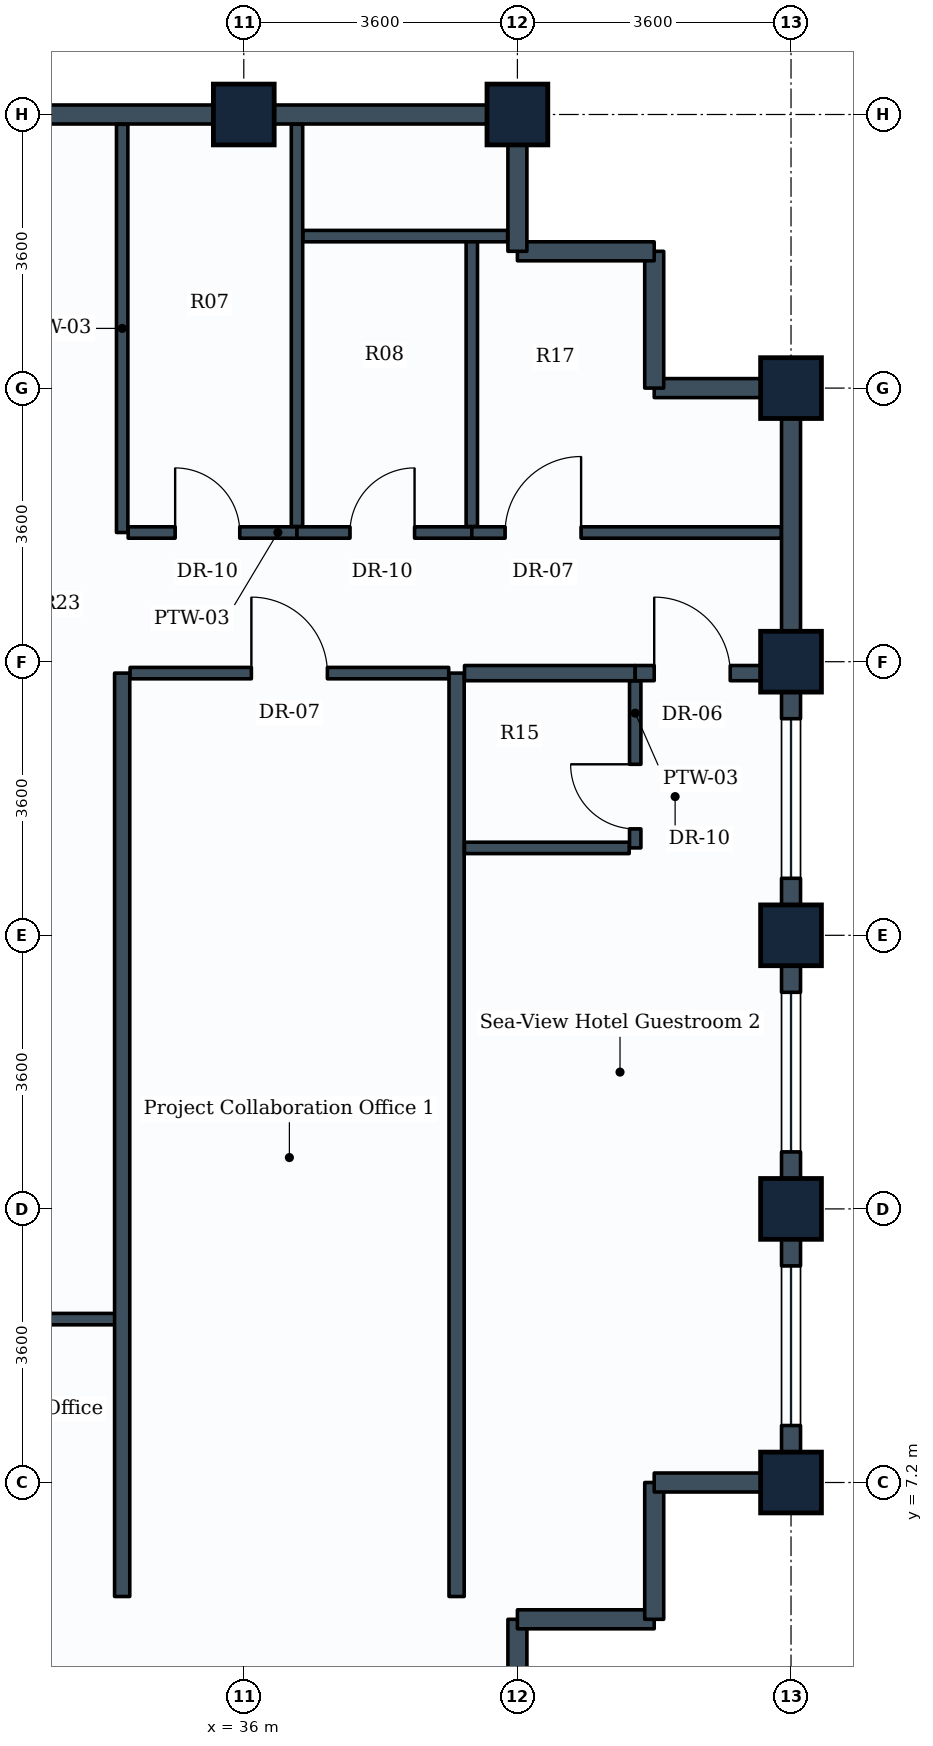
"""IFC4 building model, lengths in metres.
Left out: names, types, materials, properties, quantities, classifications, styles, units other than length and angle.
Written with IfcOpenShell. Run it as: python <this file> out.ifc"""

import sys

from ifc_helpers import new_model, si_unit, direction, frame, frame_2d, origin, origin_2d, place, context, subcontext, project, spatial, rectangle, extrude, element, fill, save


model = new_model("IFC4")
c1 = context("Model", 3, precision=1e-05, world=origin(), true_north=direction((0.0, 1.0)))
c2 = subcontext(c1, "Body", "Model", "MODEL_VIEW")
j1 = project(units=[si_unit("LENGTHUNIT", "METRE"), si_unit("PLANEANGLEUNIT", "RADIAN")], contexts=[c1])
p1 = place(None, origin())
s1 = spatial("IfcSite", under=j1, at=p1, CompositionType="ELEMENT")
p2 = place(p1, origin())
s2 = spatial("IfcBuilding", under=s1, at=p2, CompositionType="ELEMENT")
p3 = place(p2, frame((0.0, 0.0, 239.0)))
s3 = spatial("IfcBuildingStorey", under=s2, at=p3, CompositionType="ELEMENT", Elevation=239.0)
for number, where, z_axis, x_axis in (
    (1, (36.0, 25.2, 0.0), (0.0, 0.0, 1.0), (1.0, 0.0, 0.0)),
    (2, (39.6, 25.2, 0.0), (0.0, 0.0, 1.0), (1.0, 0.0, 0.0)),
    (3, (43.2, 7.2, 0.0), (0.0, 0.0, 1.0), (1.0, 0.0, 0.0)),
    (4, (43.2, 10.8, 0.0), (0.0, 0.0, 1.0), (0.0, 1.0, 0.0)),
    (5, (43.2, 14.4, 0.0), (0.0, 0.0, 1.0), (0.0, 1.0, 0.0)),
    (6, (43.2, 18.0, 0.0), (0.0, 0.0, 1.0), (0.0, 1.0, 0.0)),
    (7, (43.2, 21.6, 0.0), (0.0, 0.0, 1.0), (0.0, 1.0, 0.0)),
):
    element("IfcColumn", number, at=place(p3, frame(where, z_axis=z_axis, x_axis=x_axis)), inside=s3, PredefinedType="COLUMN", context=c2, shape_type="SweptSolid", body=[
        extrude(rectangle(XDim=0.8, YDim=0.8, at=origin_2d()), origin(), (0.0, 0.0, 1.0), 3.6),
    ])
p4 = place(p3, frame((39.6, 5.4, 0.0), z_axis=(0.0, 0.0, 1.0), x_axis=(0.0, -1.0, 0.0)))
e8 = element("IfcWall", 8, at=p4, inside=s3, PredefinedType="STANDARD", context=c2, shape_type="SweptSolid", body=[
    extrude(rectangle(XDim=1.8, YDim=0.25, at=frame_2d((0.9, 0.0))), origin(), (0.0, 0.0, 1.0), 2.83),
])
p5 = place(p3, frame((41.4, 5.4, 0.0), z_axis=(0.0, 0.0, 1.0), x_axis=(-1.0, 0.0, 0.0)))
e9 = element("IfcWall", 9, at=p5, inside=s3, PredefinedType="STANDARD", context=c2, shape_type="SweptSolid", body=[
    extrude(rectangle(XDim=1.8, YDim=0.25, at=frame_2d((0.9, 0.0))), origin(), (0.0, 0.0, 1.0), 3.335),
])
p6 = place(p3, frame((41.4, 7.2, 0.0), z_axis=(0.0, 0.0, 1.0), x_axis=(0.0, -1.0, 0.0)))
e10 = element("IfcWall", 10, at=p6, inside=s3, PredefinedType="STANDARD", context=c2, shape_type="SweptSolid", body=[
    extrude(rectangle(XDim=1.8, YDim=0.25, at=frame_2d((0.9, 0.0))), origin(), (0.0, 0.0, 1.0), 3.335),
])
p7 = place(p3, frame((43.2, 7.2, 0.0), z_axis=(0.0, 0.0, 1.0), x_axis=(-1.0, 0.0, 0.0)))
e11 = element("IfcWall", 11, at=p7, inside=s3, PredefinedType="STANDARD", context=c2, shape_type="SweptSolid", body=[
    extrude(rectangle(XDim=1.8, YDim=0.25, at=frame_2d((0.9, 0.0))), origin(), (0.0, 0.0, 1.0), 2.83),
])
p8 = place(p3, frame((43.2, 10.8, 0.0), z_axis=(0.0, 0.0, 1.0), x_axis=(0.0, -1.0, 0.0)))
e12 = element("IfcWall", 12, at=p8, inside=s3, PredefinedType="STANDARD", context=c2, shape_type="SweptSolid", body=[
    extrude(rectangle(XDim=3.6, YDim=0.25, at=frame_2d((1.8, 0.0))), origin(), (0.0, 0.0, 1.0), 2.83),
])
p9 = place(p8, frame((0.75, 0.0, 0.85)))
e13 = element("IfcOpeningElement", 13, at=p9, cuts=e12, PredefinedType="OPENING", context=c2, shape_type="SweptSolid", body=[
    extrude(rectangle(XDim=2.1, YDim=1.35, at=frame_2d((1.05, 0.675))), frame((0.0, 0.135, 0.0), z_axis=(0.0, -1.0, 0.0), x_axis=(1.0, 0.0, 0.0)), (0.0, 0.0, 1.0), 0.27),
])
p10 = place(p3, frame((43.2, 14.4, 0.0), z_axis=(0.0, 0.0, 1.0), x_axis=(0.0, -1.0, 0.0)))
e14 = element("IfcWall", 14, at=p10, inside=s3, PredefinedType="STANDARD", context=c2, shape_type="SweptSolid", body=[
    extrude(rectangle(XDim=3.6, YDim=0.25, at=frame_2d((1.8, 0.0))), origin(), (0.0, 0.0, 1.0), 2.83),
])
p11 = place(p10, frame((0.75, 0.0, 0.85)))
e15 = element("IfcOpeningElement", 15, at=p11, cuts=e14, PredefinedType="OPENING", context=c2, shape_type="SweptSolid", body=[
    extrude(rectangle(XDim=2.1, YDim=1.35, at=frame_2d((1.05, 0.675))), frame((0.0, 0.135, 0.0), z_axis=(0.0, -1.0, 0.0), x_axis=(1.0, 0.0, 0.0)), (0.0, 0.0, 1.0), 0.27),
])
p12 = place(p3, frame((43.2, 18.0, 0.0), z_axis=(0.0, 0.0, 1.0), x_axis=(0.0, -1.0, 0.0)))
e16 = element("IfcWall", 16, at=p12, inside=s3, PredefinedType="STANDARD", context=c2, shape_type="SweptSolid", body=[
    extrude(rectangle(XDim=3.6, YDim=0.25, at=frame_2d((1.8, 0.0))), origin(), (0.0, 0.0, 1.0), 2.83),
])
p13 = place(p12, frame((0.75, 0.0, 0.85)))
e17 = element("IfcOpeningElement", 17, at=p13, cuts=e16, PredefinedType="OPENING", context=c2, shape_type="SweptSolid", body=[
    extrude(rectangle(XDim=2.1, YDim=1.35, at=frame_2d((1.05, 0.675))), frame((0.0, 0.135, 0.0), z_axis=(0.0, -1.0, 0.0), x_axis=(1.0, 0.0, 0.0)), (0.0, 0.0, 1.0), 0.27),
])
p14 = place(p3, frame((43.2, 21.6, 0.0), z_axis=(0.0, 0.0, 1.0), x_axis=(0.0, -1.0, 0.0)))
e18 = element("IfcWall", 18, at=p14, inside=s3, PredefinedType="STANDARD", context=c2, shape_type="SweptSolid", body=[
    extrude(rectangle(XDim=3.6, YDim=0.25, at=frame_2d((1.8, 0.0))), origin(), (0.0, 0.0, 1.0), 2.83),
])
p15 = place(p3, frame((41.4, 21.6, 0.0), z_axis=(0.0, 0.0, 1.0), x_axis=(1.0, 0.0, 0.0)))
e19 = element("IfcWall", 19, at=p15, inside=s3, PredefinedType="STANDARD", context=c2, shape_type="SweptSolid", body=[
    extrude(rectangle(XDim=1.8, YDim=0.25, at=frame_2d((0.9, 0.0))), origin(), (0.0, 0.0, 1.0), 2.83),
])
for number, where, z_axis, x_axis in (
    (20, (41.4, 23.4, 0.0), (0.0, 0.0, 1.0), (0.0, -1.0, 0.0)),
    (21, (39.6, 23.4, 0.0), (0.0, 0.0, 1.0), (1.0, 0.0, 0.0)),
):
    element("IfcWall", number, at=place(p3, frame(where, z_axis=z_axis, x_axis=x_axis)), inside=s3, PredefinedType="STANDARD", context=c2, shape_type="SweptSolid", body=[
        extrude(rectangle(XDim=1.8, YDim=0.25, at=frame_2d((0.9, 0.0))), origin(), (0.0, 0.0, 1.0), 3.335),
    ])
p16 = place(p3, frame((39.6, 25.2, 0.0), z_axis=(0.0, 0.0, 1.0), x_axis=(0.0, -1.0, 0.0)))
e22 = element("IfcWall", 22, at=p16, inside=s3, PredefinedType="STANDARD", context=c2, shape_type="SweptSolid", body=[
    extrude(rectangle(XDim=1.8, YDim=0.25, at=frame_2d((0.9, 0.0))), origin(), (0.0, 0.0, 1.0), 2.83),
])
for number, where, z_axis, x_axis in (
    (23, (36.0, 25.2, 0.0), (0.0, 0.0, 1.0), (1.0, 0.0, 0.0)),
    (24, (32.4, 25.2, 0.0), (0.0, 0.0, 1.0), (1.0, 0.0, 0.0)),
):
    element("IfcWall", number, at=place(p3, frame(where, z_axis=z_axis, x_axis=x_axis)), inside=s3, PredefinedType="STANDARD", context=c2, shape_type="SweptSolid", body=[
        extrude(rectangle(XDim=3.6, YDim=0.25, at=frame_2d((1.8, 0.0))), origin(), (0.0, 0.0, 1.0), 2.83),
    ])
p17 = place(p3, frame((34.4, 19.7, 0.0), z_axis=(0.0, 0.0, 1.0), x_axis=(0.0, 1.0, 0.0)))
e25 = element("IfcWall", 25, at=p17, inside=s3, PredefinedType="PARTITIONING", context=c2, shape_type="SweptSolid", body=[
    extrude(rectangle(XDim=5.371, YDim=0.15, at=frame_2d((2.686, 0.0))), origin(), (0.0, 0.0, 1.0), 2.83),
])
p18 = place(p3, frame((34.479, 19.7, 0.0), z_axis=(0.0, 0.0, 1.0), x_axis=(1.0, 0.0, 0.0)))
e26 = element("IfcWall", 26, at=p18, inside=s3, PredefinedType="PARTITIONING", context=c2, shape_type="SweptSolid", body=[
    extrude(rectangle(XDim=2.221, YDim=0.15, at=frame_2d((1.11, 0.0))), origin(), (0.0, 0.0, 1.0), 3.02),
])
p19 = place(p18, frame((0.618, 0.0, 0.0)))
e27 = element("IfcOpeningElement", 27, at=p19, cuts=e26, PredefinedType="OPENING", context=c2, shape_type="SweptSolid", body=[
    extrude(rectangle(XDim=0.85, YDim=2.1, at=frame_2d((0.425, 1.05))), frame((0.0, 0.085, 0.0), z_axis=(0.0, -1.0, 0.0), x_axis=(1.0, 0.0, 0.0)), (0.0, 0.0, 1.0), 0.17),
])
p20 = place(p3, frame((36.7, 19.779, 0.0), z_axis=(0.0, 0.0, 1.0), x_axis=(0.0, 1.0, 0.0)))
e28 = element("IfcWall", 28, at=p20, inside=s3, PredefinedType="PARTITIONING", context=c2, shape_type="SweptSolid", body=[
    extrude(rectangle(XDim=5.292, YDim=0.15, at=frame_2d((2.646, 0.0))), origin(), (0.0, 0.0, 1.0), 2.83),
])
p21 = place(p3, frame((36.7, 19.7, 0.0), z_axis=(0.0, 0.0, 1.0), x_axis=(1.0, 0.0, 0.0)))
e29 = element("IfcWall", 29, at=p21, inside=s3, PredefinedType="PARTITIONING", context=c2, shape_type="SweptSolid", body=[
    extrude(rectangle(XDim=2.3, YDim=0.15, at=frame_2d((1.15, 0.0))), origin(), (0.0, 0.0, 1.0), 3.335),
])
p22 = place(p21, frame((0.697, 0.0, 0.0)))
e30 = element("IfcOpeningElement", 30, at=p22, cuts=e29, PredefinedType="OPENING", context=c2, shape_type="SweptSolid", body=[
    extrude(rectangle(XDim=0.85, YDim=2.1, at=frame_2d((0.425, 1.05))), frame((0.0, 0.085, 0.0), z_axis=(0.0, -1.0, 0.0), x_axis=(1.0, 0.0, 0.0)), (0.0, 0.0, 1.0), 0.17),
])
p23 = place(p3, frame((39.0, 19.779, 0.0), z_axis=(0.0, 0.0, 1.0), x_axis=(0.0, 1.0, 0.0)))
e31 = element("IfcWall", 31, at=p23, inside=s3, PredefinedType="PARTITIONING", context=c2, shape_type="SweptSolid", body=[
    extrude(rectangle(XDim=3.821, YDim=0.15, at=frame_2d((1.911, 0.0))), origin(), (0.0, 0.0, 1.0), 3.335),
])
p24 = place(p3, frame((36.779, 23.6, 0.0), z_axis=(0.0, 0.0, 1.0), x_axis=(1.0, 0.0, 0.0)))
e32 = element("IfcWall", 32, at=p24, inside=s3, PredefinedType="PARTITIONING", context=c2, shape_type="SweptSolid", body=[
    extrude(rectangle(XDim=2.692, YDim=0.15, at=frame_2d((1.346, 0.0))), origin(), (0.0, 0.0, 1.0), 3.335),
])
p25 = place(p3, frame((28.879, 9.35, 0.0), z_axis=(0.0, 0.0, 1.0), x_axis=(1.0, 0.0, 0.0)))
e33 = element("IfcWall", 33, at=p25, inside=s3, PredefinedType="PARTITIONING", context=c2, shape_type="SweptSolid", body=[
    extrude(rectangle(XDim=5.521, YDim=0.15, at=frame_2d((2.76, 0.0))), origin(), (0.0, 0.0, 1.0), 3.335),
])
p26 = place(p25, frame((0.36, 0.0, 0.0)))
e34 = element("IfcOpeningElement", 34, at=p26, cuts=e33, PredefinedType="OPENING", context=c2, shape_type="SweptSolid", body=[
    extrude(rectangle(XDim=1.0, YDim=2.1, at=frame_2d((0.5, 1.05))), frame((0.0, 0.085, 0.0), z_axis=(0.0, -1.0, 0.0), x_axis=(1.0, 0.0, 0.0)), (0.0, 0.0, 1.0), 0.17),
])
for number, where, z_axis, x_axis in (
    (35, (34.4, 5.7, 0.0), (0.0, 0.0, 1.0), (0.0, 1.0, 0.0)),
    (36, (38.8, 5.7, 0.0), (0.0, 0.0, 1.0), (0.0, 1.0, 0.0)),
):
    element("IfcWall", number, at=place(p3, frame(where, z_axis=z_axis, x_axis=x_axis)), inside=s3, PredefinedType="PARTITIONING", context=c2, shape_type="SweptSolid", body=[
        extrude(rectangle(XDim=12.15, YDim=0.2, at=frame_2d((6.075, 0.0))), origin(), (0.0, 0.0, 1.0), 3.03),
    ])
p27 = place(p3, frame((34.504, 17.85, 0.0), z_axis=(0.0, 0.0, 1.0), x_axis=(1.0, 0.0, 0.0)))
e37 = element("IfcWall", 37, at=p27, inside=s3, PredefinedType="PARTITIONING", context=c2, shape_type="SweptSolid", body=[
    extrude(rectangle(XDim=4.192, YDim=0.15, at=frame_2d((2.096, 0.0))), origin(), (0.0, 0.0, 1.0), 3.02),
])
p28 = place(p27, frame((1.596, 0.0, 0.0)))
e38 = element("IfcOpeningElement", 38, at=p28, cuts=e37, PredefinedType="OPENING", context=c2, shape_type="SweptSolid", body=[
    extrude(rectangle(XDim=1.0, YDim=2.1, at=frame_2d((0.5, 1.05))), frame((0.0, 0.085, 0.0), z_axis=(0.0, -1.0, 0.0), x_axis=(1.0, 0.0, 0.0)), (0.0, 0.0, 1.0), 0.17),
])
p29 = place(p3, frame((38.904, 17.85, 0.0), z_axis=(0.0, 0.0, 1.0), x_axis=(1.0, 0.0, 0.0)))
e39 = element("IfcWall", 39, at=p29, inside=s3, PredefinedType="PARTITIONING", context=c2, shape_type="SweptSolid", body=[
    extrude(rectangle(XDim=2.246, YDim=0.2, at=frame_2d((1.123, 0.0))), origin(), (0.0, 0.0, 1.0), 3.335),
])
p30 = place(p3, frame((41.15, 17.85, 0.0), z_axis=(0.0, 0.0, 1.0), x_axis=(1.0, 0.0, 0.0)))
e40 = element("IfcWall", 40, at=p30, inside=s3, PredefinedType="PARTITIONING", context=c2, shape_type="SweptSolid", body=[
    extrude(rectangle(XDim=1.921, YDim=0.2, at=frame_2d((0.96, 0.0))), origin(), (0.0, 0.0, 1.0), 2.83),
])
p31 = place(p30, frame((0.25, 0.0, 0.0)))
e41 = element("IfcOpeningElement", 41, at=p31, cuts=e40, PredefinedType="OPENING", context=c2, shape_type="SweptSolid", body=[
    extrude(rectangle(XDim=1.0, YDim=2.1, at=frame_2d((0.5, 1.05))), frame((0.0, 0.11, 0.0), z_axis=(0.0, -1.0, 0.0), x_axis=(1.0, 0.0, 0.0)), (0.0, 0.0, 1.0), 0.22),
])
p32 = place(p3, frame((41.15, 15.55, 0.0), z_axis=(0.0, 0.0, 1.0), x_axis=(0.0, 1.0, 0.0)))
e42 = element("IfcWall", 42, at=p32, inside=s3, PredefinedType="PARTITIONING", context=c2, shape_type="SweptSolid", body=[
    extrude(rectangle(XDim=2.196, YDim=0.15, at=frame_2d((1.098, 0.0))), origin(), (0.0, 0.0, 1.0), 3.335),
])
p33 = place(p32, frame((0.25, 0.0, 0.0)))
e43 = element("IfcOpeningElement", 43, at=p33, cuts=e42, PredefinedType="OPENING", context=c2, shape_type="SweptSolid", body=[
    extrude(rectangle(XDim=0.85, YDim=2.1, at=frame_2d((0.425, 1.05))), frame((0.0, 0.085, 0.0), z_axis=(0.0, -1.0, 0.0), x_axis=(1.0, 0.0, 0.0)), (0.0, 0.0, 1.0), 0.17),
])
p34 = place(p3, frame((38.904, 15.55, 0.0), z_axis=(0.0, 0.0, 1.0), x_axis=(1.0, 0.0, 0.0)))
e44 = element("IfcWall", 44, at=p34, inside=s3, PredefinedType="PARTITIONING", context=c2, shape_type="SweptSolid", body=[
    extrude(rectangle(XDim=2.167, YDim=0.15, at=frame_2d((1.083, 0.0))), origin(), (0.0, 0.0, 1.0), 3.335),
])
p35 = place(p3, frame((39.0, 19.7, 0.0), z_axis=(0.0, 0.0, 1.0), x_axis=(1.0, 0.0, 0.0)))
e45 = element("IfcWall", 45, at=p35, inside=s3, PredefinedType="PARTITIONING", context=c2, shape_type="SweptSolid", body=[
    extrude(rectangle(XDim=4.071, YDim=0.15, at=frame_2d((2.036, 0.0))), origin(), (0.0, 0.0, 1.0), 2.83),
])
p36 = place(p35, frame((0.438, 0.0, 0.0)))
e46 = element("IfcOpeningElement", 46, at=p36, cuts=e45, PredefinedType="OPENING", context=c2, shape_type="SweptSolid", body=[
    extrude(rectangle(XDim=1.0, YDim=2.1, at=frame_2d((0.5, 1.05))), frame((0.0, 0.085, 0.0), z_axis=(0.0, -1.0, 0.0), x_axis=(1.0, 0.0, 0.0)), (0.0, 0.0, 1.0), 0.17),
])
p37 = place(p9, origin())
e47 = element("IfcWindow", 47, at=p37, inside=s3, PartitioningType="SINGLE_PANEL", PredefinedType="WINDOW", context=c2, shape_type="SweptSolid", body=[
    extrude(rectangle(XDim=2.1, YDim=1.35, at=frame_2d((1.05, 0.675))), frame((0.0, 0.03, 0.0), z_axis=(0.0, -1.0, 0.0), x_axis=(1.0, 0.0, 0.0)), (0.0, 0.0, 1.0), 0.06),
])
fill(e13, e47)
p38 = place(p11, origin())
e48 = element("IfcWindow", 48, at=p38, inside=s3, PartitioningType="SINGLE_PANEL", PredefinedType="WINDOW", context=c2, shape_type="SweptSolid", body=[
    extrude(rectangle(XDim=2.1, YDim=1.35, at=frame_2d((1.05, 0.675))), frame((0.0, 0.03, 0.0), z_axis=(0.0, -1.0, 0.0), x_axis=(1.0, 0.0, 0.0)), (0.0, 0.0, 1.0), 0.06),
])
fill(e15, e48)
p39 = place(p13, origin())
e49 = element("IfcWindow", 49, at=p39, inside=s3, PartitioningType="SINGLE_PANEL", PredefinedType="WINDOW", context=c2, shape_type="SweptSolid", body=[
    extrude(rectangle(XDim=2.1, YDim=1.35, at=frame_2d((1.05, 0.675))), frame((0.0, 0.03, 0.0), z_axis=(0.0, -1.0, 0.0), x_axis=(1.0, 0.0, 0.0)), (0.0, 0.0, 1.0), 0.06),
])
fill(e17, e49)
p40 = place(p19, origin())
e50 = element("IfcDoor", 50, at=p40, inside=s3, OperationType="SINGLE_SWING_LEFT", PredefinedType="DOOR", context=c2, shape_type="SweptSolid", body=[
    extrude(rectangle(XDim=0.85, YDim=2.1, at=frame_2d((0.425, 1.05))), frame((0.0, 0.025, 0.0), z_axis=(0.0, -1.0, 0.0), x_axis=(1.0, 0.0, 0.0)), (0.0, 0.0, 1.0), 0.05),
])
fill(e27, e50)
p41 = place(p22, origin())
e51 = element("IfcDoor", 51, at=p41, inside=s3, OperationType="SINGLE_SWING_RIGHT", PredefinedType="DOOR", context=c2, shape_type="SweptSolid", body=[
    extrude(rectangle(XDim=0.85, YDim=2.1, at=frame_2d((0.425, 1.05))), frame((0.0, 0.025, 0.0), z_axis=(0.0, -1.0, 0.0), x_axis=(1.0, 0.0, 0.0)), (0.0, 0.0, 1.0), 0.05),
])
fill(e30, e51)
p42 = place(p28, origin())
e52 = element("IfcDoor", 52, at=p42, inside=s3, OperationType="SINGLE_SWING_LEFT", PredefinedType="DOOR", context=c2, shape_type="SweptSolid", body=[
    extrude(rectangle(XDim=1.0, YDim=2.1, at=frame_2d((0.5, 1.05))), frame((0.0, 0.025, 0.0), z_axis=(0.0, -1.0, 0.0), x_axis=(1.0, 0.0, 0.0)), (0.0, 0.0, 1.0), 0.05),
])
fill(e38, e52)
p43 = place(p31, origin())
e53 = element("IfcDoor", 53, at=p43, inside=s3, OperationType="SINGLE_SWING_LEFT", PredefinedType="DOOR", context=c2, shape_type="SweptSolid", body=[
    extrude(rectangle(XDim=1.0, YDim=2.1, at=frame_2d((0.5, 1.05))), frame((0.0, 0.025, 0.0), z_axis=(0.0, -1.0, 0.0), x_axis=(1.0, 0.0, 0.0)), (0.0, 0.0, 1.0), 0.05),
])
fill(e41, e53)
p44 = place(p33, origin())
e54 = element("IfcDoor", 54, at=p44, inside=s3, OperationType="SINGLE_SWING_RIGHT", PredefinedType="DOOR", context=c2, shape_type="SweptSolid", body=[
    extrude(rectangle(XDim=0.85, YDim=2.1, at=frame_2d((0.425, 1.05))), frame((0.0, 0.025, 0.0), z_axis=(0.0, -1.0, 0.0), x_axis=(1.0, 0.0, 0.0)), (0.0, 0.0, 1.0), 0.05),
])
fill(e43, e54)
p45 = place(p36, origin())
e55 = element("IfcDoor", 55, at=p45, inside=s3, OperationType="SINGLE_SWING_RIGHT", PredefinedType="DOOR", context=c2, shape_type="SweptSolid", body=[
    extrude(rectangle(XDim=1.0, YDim=2.1, at=frame_2d((0.5, 1.05))), frame((0.0, 0.025, 0.0), z_axis=(0.0, -1.0, 0.0), x_axis=(1.0, 0.0, 0.0)), (0.0, 0.0, 1.0), 0.05),
])
fill(e46, e55)
save(model, sys.argv[1])
